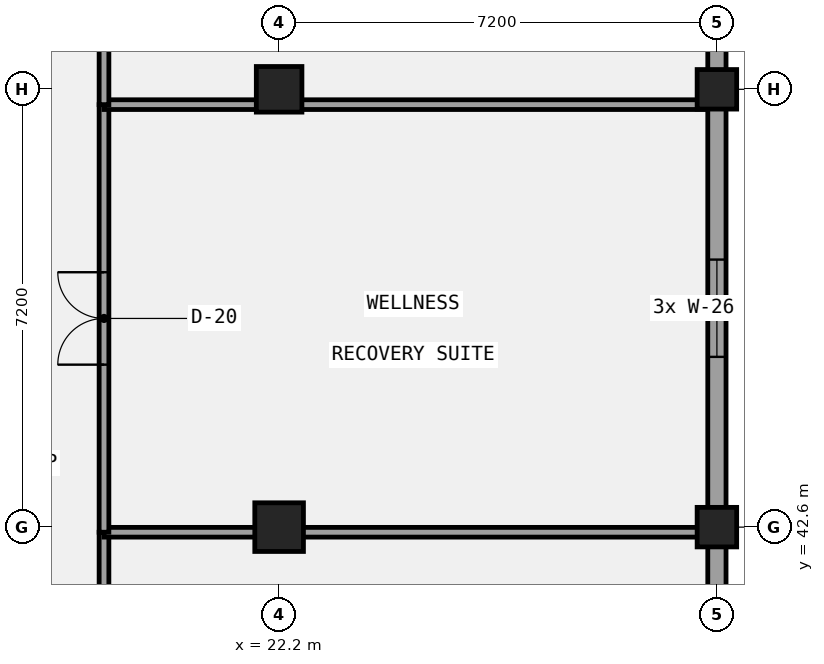
"""IFC4 building model, lengths in metres.
Left out: names, types, materials, properties, quantities, classifications, styles, units other than length and angle.
Written with IfcOpenShell. Run it as: python <this file> out.ifc"""

import sys

from ifc_helpers import new_model, si_unit, direction, frame, frame_2d, origin, origin_2d, place, context, subcontext, project, spatial, rectangle, circle, extrude, element, fill, save


model = new_model("IFC4")
c1 = context("Model", 3, precision=1e-05, world=origin(), true_north=direction((0.0, 1.0)))
c2 = subcontext(c1, "Body", "Model", "MODEL_VIEW")
j1 = project(units=[si_unit("LENGTHUNIT", "METRE"), si_unit("PLANEANGLEUNIT", "RADIAN")], contexts=[c1])
p1 = place(None, origin())
s1 = spatial("IfcSite", under=j1, at=p1, CompositionType="ELEMENT")
p2 = place(p1, origin())
s2 = spatial("IfcBuilding", under=s1, at=p2, CompositionType="ELEMENT")
p3 = place(p2, frame((0.0, 0.0, 5.4)))
s3 = spatial("IfcBuildingStorey", under=s2, at=p3, CompositionType="ELEMENT", Elevation=5.4)
p4 = place(p3, frame((22.2, 42.6, 0.0), z_axis=(0.0, 0.0, 1.0), x_axis=(1.0, 0.0, 0.0)))
e1 = element("IfcColumn", 1, at=p4, inside=s3, PredefinedType="COLUMN", context=c2, shape_type="SweptSolid", body=[
    extrude(rectangle(XDim=0.8, YDim=0.8, at=origin_2d()), origin(), (0.0, 0.0, 1.0), 4.2),
])
p5 = place(p3, frame((22.2, 49.8, 0.0), z_axis=(0.0, 0.0, 1.0), x_axis=(1.0, 0.0, 0.0)))
e2 = element("IfcColumn", 2, at=p5, inside=s3, PredefinedType="COLUMN", context=c2, shape_type="SweptSolid", body=[
    extrude(rectangle(XDim=0.75, YDim=0.75, at=origin_2d()), origin(), (0.0, 0.0, 1.0), 4.2),
])
for number, where, z_axis, x_axis in (
    (3, (29.4, 42.6, 0.0), (0.0, 0.0, 1.0), (1.0, 0.0, 0.0)),
    (4, (29.4, 49.8, 0.0), (0.0, 0.0, 1.0), (1.0, 0.0, 0.0)),
):
    element("IfcColumn", number, at=place(p3, frame(where, z_axis=z_axis, x_axis=x_axis)), inside=s3, PredefinedType="COLUMN", context=c2, shape_type="SweptSolid", body=[
        extrude(circle(Radius=0.325, at=origin_2d()), origin(), (0.0, 0.0, 1.0), 4.2),
    ])
p6 = place(p3, frame((29.4, 35.55, 0.0), z_axis=(0.0, 0.0, 1.0), x_axis=(0.0, 1.0, 0.0)))
e5 = element("IfcWall", 5, at=p6, inside=s3, PredefinedType="SOLIDWALL", context=c2, shape_type="SweptSolid", body=[
    extrude(rectangle(XDim=21.3, YDim=0.3, at=frame_2d((10.65, 0.0))), origin(), (0.0, 0.0, 1.0), 2.92),
])
p7 = place(p6, frame((2.725, 0.0, 1.0)))
e6 = element("IfcOpeningElement", 6, at=p7, cuts=e5, PredefinedType="OPENING", context=c2, shape_type="SweptSolid", body=[
    extrude(rectangle(XDim=1.6, YDim=1.4, at=frame_2d((0.8, 0.7))), frame((0.0, 0.16, 0.0), z_axis=(0.0, -1.0, 0.0), x_axis=(1.0, 0.0, 0.0)), (0.0, 0.0, 1.0), 0.32),
])
p8 = place(p6, frame((9.85, 0.0, 1.0)))
e7 = element("IfcOpeningElement", 7, at=p8, cuts=e5, PredefinedType="OPENING", context=c2, shape_type="SweptSolid", body=[
    extrude(rectangle(XDim=1.6, YDim=1.4, at=frame_2d((0.8, 0.7))), frame((0.0, 0.16, 0.0), z_axis=(0.0, -1.0, 0.0), x_axis=(1.0, 0.0, 0.0)), (0.0, 0.0, 1.0), 0.32),
])
p9 = place(p6, frame((16.975, 0.0, 1.0)))
e8 = element("IfcOpeningElement", 8, at=p9, cuts=e5, PredefinedType="OPENING", context=c2, shape_type="SweptSolid", body=[
    extrude(rectangle(XDim=1.6, YDim=1.4, at=frame_2d((0.8, 0.7))), frame((0.0, 0.16, 0.0), z_axis=(0.0, -1.0, 0.0), x_axis=(1.0, 0.0, 0.0)), (0.0, 0.0, 1.0), 0.32),
])
p10 = place(p3, frame((19.32, 35.484, 0.0), z_axis=(0.0, 0.0, 1.0), x_axis=(0.0, 1.0, 0.0)))
e9 = element("IfcWall", 9, at=p10, inside=s3, PredefinedType="PARTITIONING", context=c2, shape_type="SweptSolid", body=[
    extrude(rectangle(XDim=7.032, YDim=0.16, at=frame_2d((3.516, 0.0))), origin(), (0.0, 0.0, 1.0), 3.92),
])
p11 = place(p10, frame((2.756, 0.0, 0.0)))
e10 = element("IfcOpeningElement", 10, at=p11, cuts=e9, PredefinedType="OPENING", context=c2, shape_type="SweptSolid", body=[
    extrude(rectangle(XDim=1.52, YDim=2.1, at=frame_2d((0.76, 1.05))), frame((0.0, 0.09, 0.0), z_axis=(0.0, -1.0, 0.0), x_axis=(1.0, 0.0, 0.0)), (0.0, 0.0, 1.0), 0.18),
])
p12 = place(p3, frame((19.32, 42.516, 0.0), z_axis=(0.0, 0.0, 1.0), x_axis=(1.0, 0.0, 0.0)))
e11 = element("IfcWall", 11, at=p12, inside=s3, PredefinedType="PARTITIONING", context=c2, shape_type="SweptSolid", body=[
    extrude(rectangle(XDim=9.9, YDim=0.16, at=frame_2d((4.95, 0.0))), origin(), (0.0, 0.0, 1.0), 2.72),
])
p13 = place(p3, frame((19.32, 42.516, 0.0), z_axis=(0.0, 0.0, 1.0), x_axis=(0.0, 1.0, 0.0)))
e12 = element("IfcWall", 12, at=p13, inside=s3, PredefinedType="PARTITIONING", context=c2, shape_type="SweptSolid", body=[
    extrude(rectangle(XDim=7.032, YDim=0.16, at=frame_2d((3.516, 0.0))), origin(), (0.0, 0.0, 1.0), 3.92),
])
p14 = place(p13, frame((2.756, 0.0, 0.0)))
e13 = element("IfcOpeningElement", 13, at=p14, cuts=e12, PredefinedType="OPENING", context=c2, shape_type="SweptSolid", body=[
    extrude(rectangle(XDim=1.52, YDim=2.22, at=frame_2d((0.76, 1.11))), frame((0.0, 0.09, 0.0), z_axis=(0.0, -1.0, 0.0), x_axis=(1.0, 0.0, 0.0)), (0.0, 0.0, 1.0), 0.18),
])
p15 = place(p3, frame((19.32, 49.548, 0.0), z_axis=(0.0, 0.0, 1.0), x_axis=(1.0, 0.0, 0.0)))
e14 = element("IfcWall", 14, at=p15, inside=s3, PredefinedType="PARTITIONING", context=c2, shape_type="SweptSolid", body=[
    extrude(rectangle(XDim=9.9, YDim=0.16, at=frame_2d((4.95, 0.0))), origin(), (0.0, 0.0, 1.0), 2.72),
])
p16 = place(p3, frame((19.32, 49.548, 0.0), z_axis=(0.0, 0.0, 1.0), x_axis=(0.0, 1.0, 0.0)))
e15 = element("IfcWall", 15, at=p16, inside=s3, PredefinedType="PARTITIONING", context=c2, shape_type="SweptSolid", body=[
    extrude(rectangle(XDim=7.032, YDim=0.16, at=frame_2d((3.516, 0.0))), origin(), (0.0, 0.0, 1.0), 3.92),
])
p17 = place(p16, frame((2.756, 0.0, 0.0)))
e16 = element("IfcOpeningElement", 16, at=p17, cuts=e15, PredefinedType="OPENING", context=c2, shape_type="SweptSolid", body=[
    extrude(rectangle(XDim=1.52, YDim=2.35, at=frame_2d((0.76, 1.175))), frame((0.0, 0.09, 0.0), z_axis=(0.0, -1.0, 0.0), x_axis=(1.0, 0.0, 0.0)), (0.0, 0.0, 1.0), 0.18),
])
p18 = place(p8, origin())
e17 = element("IfcWindow", 17, at=p18, inside=s3, PartitioningType="SINGLE_PANEL", PredefinedType="WINDOW", context=c2, shape_type="SweptSolid", body=[
    extrude(rectangle(XDim=1.6, YDim=1.4, at=frame_2d((0.8, 0.7))), frame((0.0, 0.03, 0.0), z_axis=(0.0, -1.0, 0.0), x_axis=(1.0, 0.0, 0.0)), (0.0, 0.0, 1.0), 0.06),
])
fill(e7, e17)
p19 = place(p14, origin())
e18 = element("IfcDoor", 18, at=p19, inside=s3, OperationType="DOUBLE_DOOR_SINGLE_SWING", PredefinedType="DOOR", context=c2, shape_type="SweptSolid", body=[
    extrude(rectangle(XDim=1.52, YDim=2.22, at=frame_2d((0.76, 1.11))), frame((0.0, 0.025, 0.0), z_axis=(0.0, -1.0, 0.0), x_axis=(1.0, 0.0, 0.0)), (0.0, 0.0, 1.0), 0.05),
])
fill(e13, e18)
save(model, sys.argv[1])
